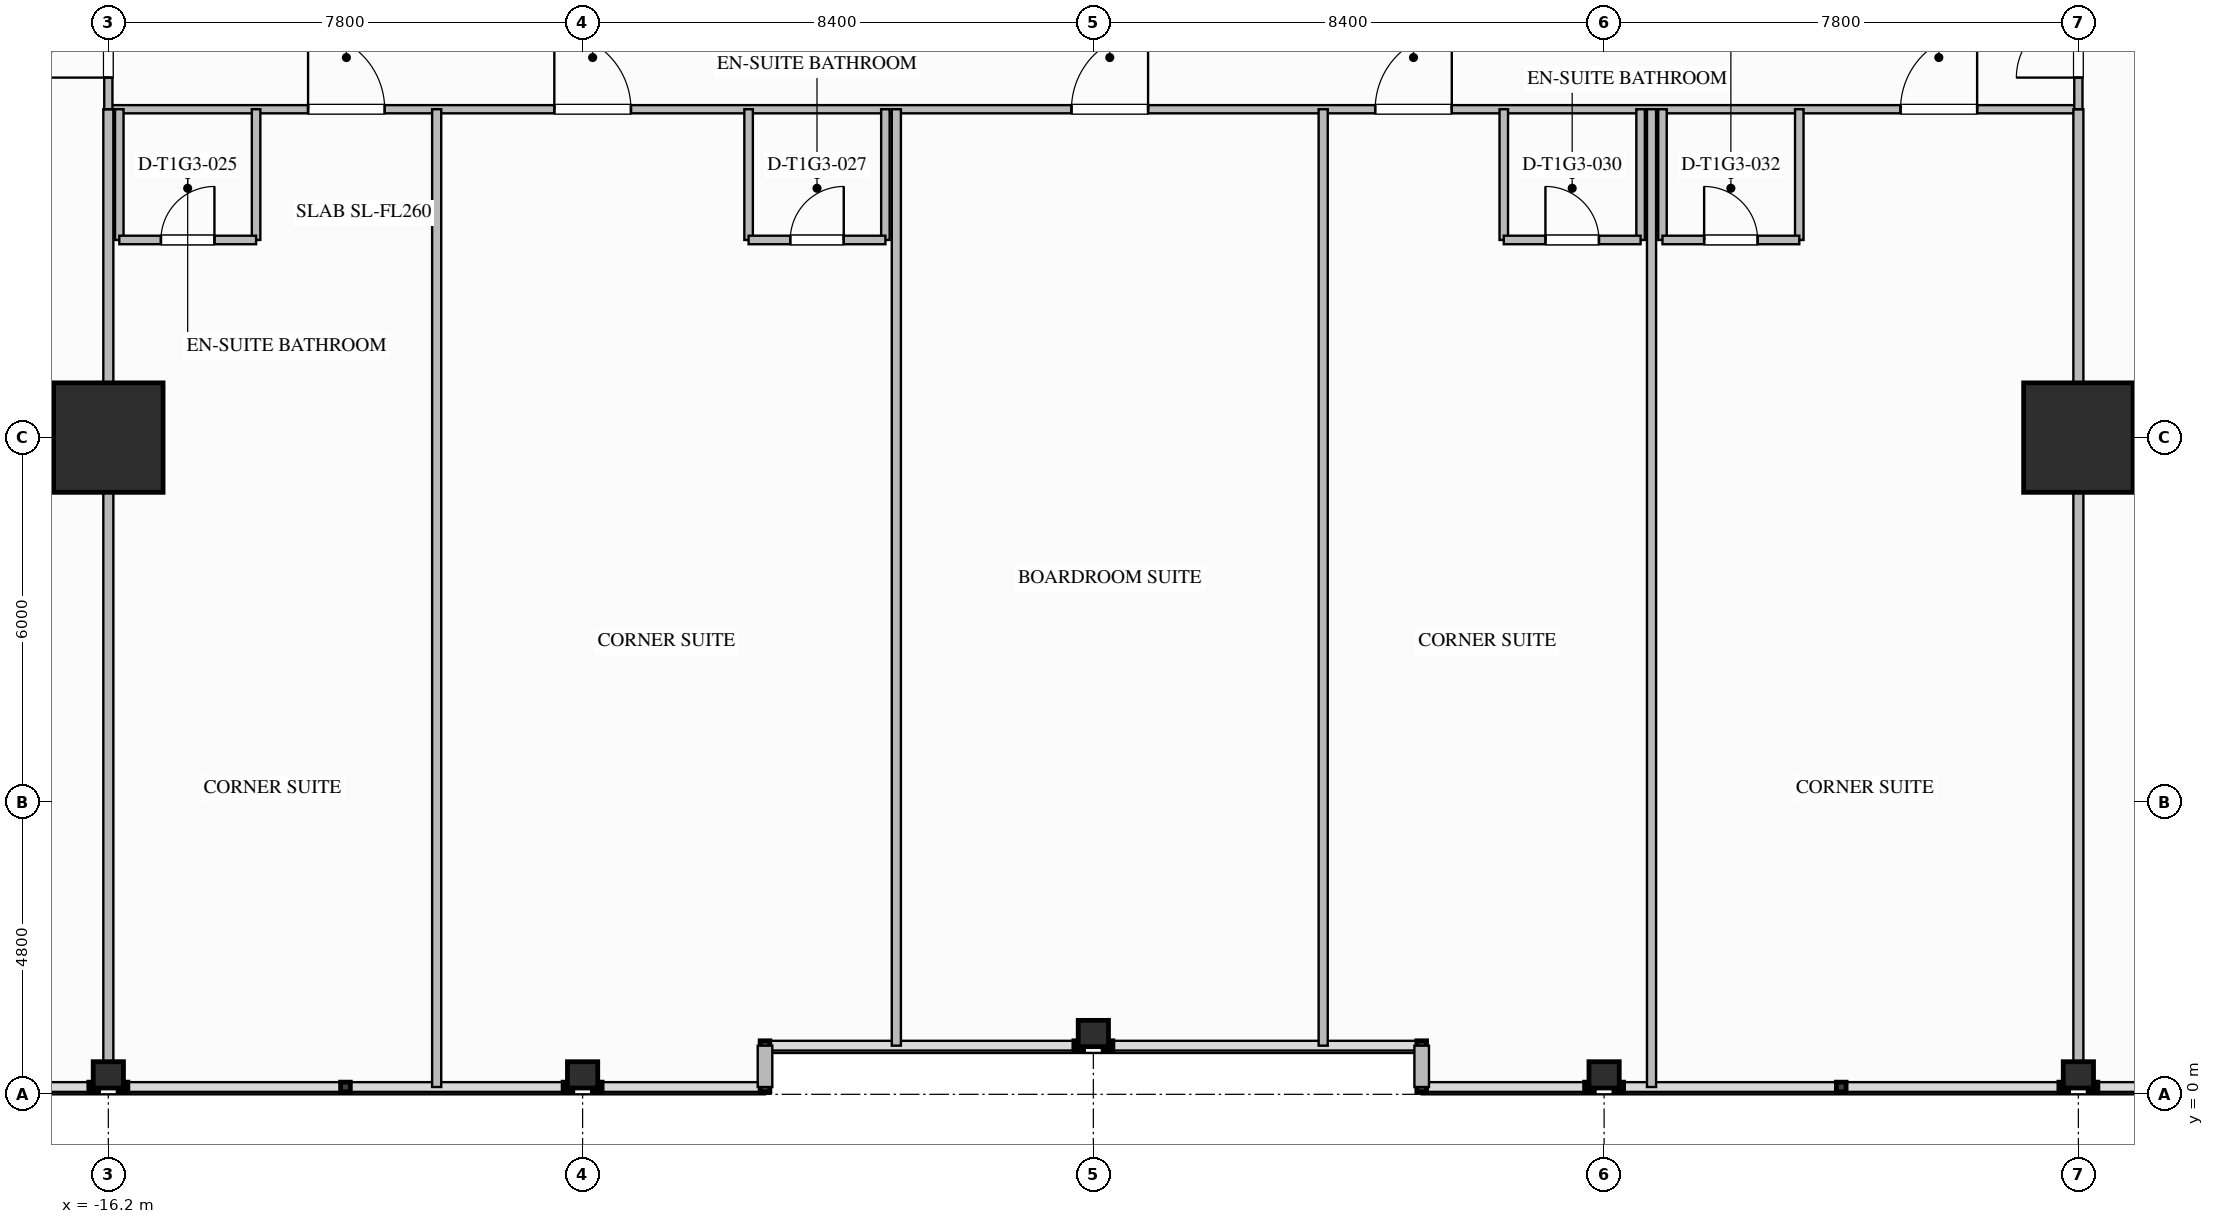
"""IFC4 building model, lengths in metres.
Left out: names, types, materials, properties, quantities, classifications, styles, units other than length and angle.
Written with IfcOpenShell. Run it as: python <this file> out.ifc"""

import sys

from ifc_helpers import new_model, si_unit, direction, frame, frame_2d, origin, origin_2d, place, context, subcontext, project, spatial, rectangle, i_section, extrude, element, fill, save


model = new_model("IFC4")
c1 = context("Model", 3, precision=1e-05, world=origin(), true_north=direction((0.0, 1.0)))
c2 = subcontext(c1, "Body", "Model", "MODEL_VIEW")
j1 = project(units=[si_unit("LENGTHUNIT", "METRE"), si_unit("PLANEANGLEUNIT", "RADIAN")], contexts=[c1])
p1 = place(None, origin())
s1 = spatial("IfcSite", under=j1, at=p1, CompositionType="ELEMENT")
p2 = place(p1, origin())
s2 = spatial("IfcBuilding", under=s1, at=p2, CompositionType="ELEMENT")
p3 = place(p2, frame((0.0, 0.0, 54.2)))
s3 = spatial("IfcBuildingStorey", under=s2, at=p3, CompositionType="ELEMENT", Elevation=54.2)
for number, where, z_axis, x_axis in (
    (1, (-16.2, 10.8, 0.0), (0.0, 0.0, 1.0), (1.0, 0.0, 0.0)),
    (2, (16.2, 10.8, 0.0), (0.0, 0.0, 1.0), (1.0, 0.0, 0.0)),
):
    element("IfcColumn", number, at=place(p3, frame(where, z_axis=z_axis, x_axis=x_axis)), inside=s3, PredefinedType="COLUMN", context=c2, shape_type="SweptSolid", body=[
        extrude(rectangle(XDim=1.8, YDim=1.8, at=origin_2d()), origin(), (0.0, 0.0, 1.0), 3.5),
    ])
for number, where, z_axis, x_axis in (
    (3, (-16.2, 0.32, 0.0), (0.0, 0.0, 1.0), (0.0, 1.0, 0.0)),
    (4, (-8.4, 0.32, 0.0), (0.0, 0.0, 1.0), (0.0, 1.0, 0.0)),
    (5, (0.0, 1.0, 0.0), (0.0, 0.0, 1.0), (0.0, 1.0, 0.0)),
    (6, (8.4, 0.32, 0.0), (0.0, 0.0, 1.0), (0.0, 1.0, 0.0)),
    (7, (16.2, 0.32, 0.0), (0.0, 0.0, 1.0), (0.0, 1.0, 0.0)),
):
    element("IfcColumn", number, at=place(p3, frame(where, z_axis=z_axis, x_axis=x_axis)), inside=s3, PredefinedType="COLUMN", context=c2, shape_type="SweptSolid", body=[
        extrude(i_section(OverallWidth=0.432, OverallDepth=0.498, WebThickness=0.056, FlangeThickness=0.089, FilletRadius=0.03, at=origin_2d()), origin(), (0.0, 0.0, 1.0), 3.497),
    ])
for number, where, z_axis, x_axis in (
    (8, (5.4, 0.12, 0.0), (0.0, 0.0, 1.0), (0.0, 1.0, 0.0)),
    (9, (-5.4, 0.8, 0.0), (0.0, 0.0, 1.0), (0.0, -1.0, 0.0)),
):
    element("IfcWall", number, at=place(p3, frame(where, z_axis=z_axis, x_axis=x_axis)), inside=s3, PredefinedType="STANDARD", context=c2, shape_type="SweptSolid", body=[
        extrude(rectangle(XDim=0.68, YDim=0.24, at=frame_2d((0.34, 0.0))), origin(), (0.0, 0.0, 1.0), 3.24),
    ])
p4 = place(p3, frame((-16.2, 16.2, 0.0), z_axis=(0.0, 0.0, 1.0), x_axis=(1.0, 0.0, 0.0)))
e10 = element("IfcWall", 10, at=p4, inside=s3, PredefinedType="PARTITIONING", context=c2, shape_type="SweptSolid", body=[
    extrude(rectangle(XDim=32.4, YDim=0.135, at=frame_2d((16.2, 0.0))), origin(), (0.0, 0.0, 1.0), 3.24),
])
p5 = place(p4, frame((3.285, 0.0, 0.0)))
e11 = element("IfcOpeningElement", 11, at=p5, cuts=e10, PredefinedType="OPENING", context=c2, shape_type="SweptSolid", body=[
    extrude(rectangle(XDim=1.26, YDim=2.2, at=frame_2d((0.63, 1.1))), frame((0.0, 0.077, 0.0), z_axis=(0.0, -1.0, 0.0), x_axis=(1.0, 0.0, 0.0)), (0.0, 0.0, 1.0), 0.155),
])
p6 = place(p4, frame((7.335, 0.0, 0.0)))
e12 = element("IfcOpeningElement", 12, at=p6, cuts=e10, PredefinedType="OPENING", context=c2, shape_type="SweptSolid", body=[
    extrude(rectangle(XDim=1.26, YDim=2.2, at=frame_2d((0.63, 1.1))), frame((0.0, 0.077, 0.0), z_axis=(0.0, -1.0, 0.0), x_axis=(1.0, 0.0, 0.0)), (0.0, 0.0, 1.0), 0.155),
])
p7 = place(p4, frame((15.84, 0.0, 0.0)))
e13 = element("IfcOpeningElement", 13, at=p7, cuts=e10, PredefinedType="OPENING", context=c2, shape_type="SweptSolid", body=[
    extrude(rectangle(XDim=1.26, YDim=2.2, at=frame_2d((0.63, 1.1))), frame((0.0, 0.077, 0.0), z_axis=(0.0, -1.0, 0.0), x_axis=(1.0, 0.0, 0.0)), (0.0, 0.0, 1.0), 0.155),
])
p8 = place(p4, frame((20.835, 0.0, 0.0)))
e14 = element("IfcOpeningElement", 14, at=p8, cuts=e10, PredefinedType="OPENING", context=c2, shape_type="SweptSolid", body=[
    extrude(rectangle(XDim=1.26, YDim=2.2, at=frame_2d((0.63, 1.1))), frame((0.0, 0.077, 0.0), z_axis=(0.0, -1.0, 0.0), x_axis=(1.0, 0.0, 0.0)), (0.0, 0.0, 1.0), 0.155),
])
p9 = place(p4, frame((29.475, 0.0, 0.0)))
e15 = element("IfcOpeningElement", 15, at=p9, cuts=e10, PredefinedType="OPENING", context=c2, shape_type="SweptSolid", body=[
    extrude(rectangle(XDim=1.26, YDim=2.2, at=frame_2d((0.63, 1.1))), frame((0.0, 0.077, 0.0), z_axis=(0.0, -1.0, 0.0), x_axis=(1.0, 0.0, 0.0)), (0.0, 0.0, 1.0), 0.155),
])
for number, where, z_axis, x_axis in (
    (16, (-16.2, 0.12, 0.0), (0.0, 0.0, 1.0), (0.0, 1.0, 0.0)),
    (17, (16.2, 0.12, 0.0), (0.0, 0.0, 1.0), (0.0, 1.0, 0.0)),
):
    element("IfcWall", number, at=place(p3, frame(where, z_axis=z_axis, x_axis=x_axis)), inside=s3, PredefinedType="PARTITIONING", context=c2, shape_type="SweptSolid", body=[
        extrude(rectangle(XDim=16.08, YDim=0.165, at=frame_2d((8.04, 0.0))), origin(), (0.0, 0.0, 1.0), 2.298),
    ])
p10 = place(p3, frame((-16.2, 16.2, 0.0), z_axis=(0.0, 0.0, 1.0), x_axis=(0.0, 1.0, 0.0)))
e18 = element("IfcWall", 18, at=p10, inside=s3, PredefinedType="PARTITIONING", context=c2, shape_type="SweptSolid", body=[
    extrude(rectangle(XDim=2.1, YDim=0.135, at=frame_2d((1.05, 0.0))), origin(), (0.0, 0.0, 1.0), 2.298),
])
p11 = place(p10, frame((0.52, 0.0, 0.0)))
e19 = element("IfcOpeningElement", 19, at=p11, cuts=e18, PredefinedType="OPENING", context=c2, shape_type="SweptSolid", body=[
    extrude(rectangle(XDim=1.02, YDim=2.15, at=frame_2d((0.51, 1.075))), frame((0.0, 0.077, 0.0), z_axis=(0.0, -1.0, 0.0), x_axis=(1.0, 0.0, 0.0)), (0.0, 0.0, 1.0), 0.155),
])
p12 = place(p3, frame((16.2, 16.2, 0.0), z_axis=(0.0, 0.0, 1.0), x_axis=(0.0, 1.0, 0.0)))
e20 = element("IfcWall", 20, at=p12, inside=s3, PredefinedType="PARTITIONING", context=c2, shape_type="SweptSolid", body=[
    extrude(rectangle(XDim=2.1, YDim=0.135, at=frame_2d((1.05, 0.0))), origin(), (0.0, 0.0, 1.0), 2.298),
])
p13 = place(p12, frame((0.52, 0.0, 0.0)))
e21 = element("IfcOpeningElement", 21, at=p13, cuts=e20, PredefinedType="OPENING", context=c2, shape_type="SweptSolid", body=[
    extrude(rectangle(XDim=1.02, YDim=2.15, at=frame_2d((0.51, 1.075))), frame((0.0, 0.077, 0.0), z_axis=(0.0, -1.0, 0.0), x_axis=(1.0, 0.0, 0.0)), (0.0, 0.0, 1.0), 0.155),
])
p14 = place(p3, frame((-16.02, 16.2, 0.0), z_axis=(0.0, 0.0, 1.0), x_axis=(0.0, -1.0, 0.0)))
e22 = element("IfcWall", 22, at=p14, inside=s3, PredefinedType="PLUMBINGWALL", context=c2, shape_type="SweptSolid", body=[
    extrude(rectangle(XDim=2.15, YDim=0.14, at=frame_2d((1.075, 0.0))), origin(), (0.0, 0.0, 1.0), 2.298),
])
p15 = place(p3, frame((-13.77, 16.2, 0.0), z_axis=(0.0, 0.0, 1.0), x_axis=(0.0, -1.0, 0.0)))
e23 = element("IfcWall", 23, at=p15, inside=s3, PredefinedType="PLUMBINGWALL", context=c2, shape_type="SweptSolid", body=[
    extrude(rectangle(XDim=2.15, YDim=0.14, at=frame_2d((1.075, 0.0))), origin(), (0.0, 0.0, 1.0), 3.24),
])
p16 = place(p3, frame((-16.02, 14.05, 0.0), z_axis=(0.0, 0.0, 1.0), x_axis=(1.0, 0.0, 0.0)))
e24 = element("IfcWall", 24, at=p16, inside=s3, PredefinedType="PLUMBINGWALL", context=c2, shape_type="SweptSolid", body=[
    extrude(rectangle(XDim=2.25, YDim=0.14, at=frame_2d((1.125, 0.0))), origin(), (0.0, 0.0, 1.0), 3.24),
])
p17 = place(p16, frame((0.685, 0.0, 0.0)))
e25 = element("IfcOpeningElement", 25, at=p17, cuts=e24, PredefinedType="OPENING", context=c2, shape_type="SweptSolid", body=[
    extrude(rectangle(XDim=0.88, YDim=2.1, at=frame_2d((0.44, 1.05))), frame((0.0, 0.08, 0.0), z_axis=(0.0, -1.0, 0.0), x_axis=(1.0, 0.0, 0.0)), (0.0, 0.0, 1.0), 0.16),
])
p18 = place(p3, frame((-10.8, 0.12, 0.0), z_axis=(0.0, 0.0, 1.0), x_axis=(0.0, 1.0, 0.0)))
e26 = element("IfcWall", 26, at=p18, inside=s3, PredefinedType="PARTITIONING", context=c2, shape_type="SweptSolid", body=[
    extrude(rectangle(XDim=16.08, YDim=0.15, at=frame_2d((8.04, 0.0))), origin(), (0.0, 0.0, 1.0), 3.24),
])
for number, where, z_axis, x_axis in (
    (27, (-5.67, 16.2, 0.0), (0.0, 0.0, 1.0), (0.0, -1.0, 0.0)),
    (28, (-3.42, 16.2, 0.0), (0.0, 0.0, 1.0), (0.0, -1.0, 0.0)),
):
    element("IfcWall", number, at=place(p3, frame(where, z_axis=z_axis, x_axis=x_axis)), inside=s3, PredefinedType="PLUMBINGWALL", context=c2, shape_type="SweptSolid", body=[
        extrude(rectangle(XDim=2.15, YDim=0.14, at=frame_2d((1.075, 0.0))), origin(), (0.0, 0.0, 1.0), 3.24),
    ])
p19 = place(p3, frame((-5.67, 14.05, 0.0), z_axis=(0.0, 0.0, 1.0), x_axis=(1.0, 0.0, 0.0)))
e29 = element("IfcWall", 29, at=p19, inside=s3, PredefinedType="PLUMBINGWALL", context=c2, shape_type="SweptSolid", body=[
    extrude(rectangle(XDim=2.25, YDim=0.14, at=frame_2d((1.125, 0.0))), origin(), (0.0, 0.0, 1.0), 3.24),
])
p20 = place(p19, frame((0.685, 0.0, 0.0)))
e30 = element("IfcOpeningElement", 30, at=p20, cuts=e29, PredefinedType="OPENING", context=c2, shape_type="SweptSolid", body=[
    extrude(rectangle(XDim=0.88, YDim=2.1, at=frame_2d((0.44, 1.05))), frame((0.0, 0.08, 0.0), z_axis=(0.0, -1.0, 0.0), x_axis=(1.0, 0.0, 0.0)), (0.0, 0.0, 1.0), 0.16),
])
for number, where, z_axis, x_axis in (
    (31, (-3.24, 0.8, 0.0), (0.0, 0.0, 1.0), (0.0, 1.0, 0.0)),
    (32, (3.78, 0.8, 0.0), (0.0, 0.0, 1.0), (0.0, 1.0, 0.0)),
):
    element("IfcWall", number, at=place(p3, frame(where, z_axis=z_axis, x_axis=x_axis)), inside=s3, PredefinedType="PARTITIONING", context=c2, shape_type="SweptSolid", body=[
        extrude(rectangle(XDim=15.4, YDim=0.15, at=frame_2d((7.7, 0.0))), origin(), (0.0, 0.0, 1.0), 3.24),
    ])
for number, where, z_axis, x_axis in (
    (33, (6.75, 16.2, 0.0), (0.0, 0.0, 1.0), (0.0, -1.0, 0.0)),
    (34, (9.0, 16.2, 0.0), (0.0, 0.0, 1.0), (0.0, -1.0, 0.0)),
):
    element("IfcWall", number, at=place(p3, frame(where, z_axis=z_axis, x_axis=x_axis)), inside=s3, PredefinedType="PLUMBINGWALL", context=c2, shape_type="SweptSolid", body=[
        extrude(rectangle(XDim=2.15, YDim=0.14, at=frame_2d((1.075, 0.0))), origin(), (0.0, 0.0, 1.0), 3.24),
    ])
p21 = place(p3, frame((6.75, 14.05, 0.0), z_axis=(0.0, 0.0, 1.0), x_axis=(1.0, 0.0, 0.0)))
e35 = element("IfcWall", 35, at=p21, inside=s3, PredefinedType="PLUMBINGWALL", context=c2, shape_type="SweptSolid", body=[
    extrude(rectangle(XDim=2.25, YDim=0.14, at=frame_2d((1.125, 0.0))), origin(), (0.0, 0.0, 1.0), 3.24),
])
p22 = place(p21, frame((0.685, 0.0, 0.0)))
e36 = element("IfcOpeningElement", 36, at=p22, cuts=e35, PredefinedType="OPENING", context=c2, shape_type="SweptSolid", body=[
    extrude(rectangle(XDim=0.88, YDim=2.1, at=frame_2d((0.44, 1.05))), frame((0.0, 0.08, 0.0), z_axis=(0.0, -1.0, 0.0), x_axis=(1.0, 0.0, 0.0)), (0.0, 0.0, 1.0), 0.16),
])
p23 = place(p3, frame((9.18, 0.12, 0.0), z_axis=(0.0, 0.0, 1.0), x_axis=(0.0, 1.0, 0.0)))
e37 = element("IfcWall", 37, at=p23, inside=s3, PredefinedType="PARTITIONING", context=c2, shape_type="SweptSolid", body=[
    extrude(rectangle(XDim=16.08, YDim=0.15, at=frame_2d((8.04, 0.0))), origin(), (0.0, 0.0, 1.0), 3.24),
])
for number, where, z_axis, x_axis in (
    (38, (9.36, 16.2, 0.0), (0.0, 0.0, 1.0), (0.0, -1.0, 0.0)),
    (39, (11.61, 16.2, 0.0), (0.0, 0.0, 1.0), (0.0, -1.0, 0.0)),
):
    element("IfcWall", number, at=place(p3, frame(where, z_axis=z_axis, x_axis=x_axis)), inside=s3, PredefinedType="PLUMBINGWALL", context=c2, shape_type="SweptSolid", body=[
        extrude(rectangle(XDim=2.15, YDim=0.14, at=frame_2d((1.075, 0.0))), origin(), (0.0, 0.0, 1.0), 3.24),
    ])
p24 = place(p3, frame((9.36, 14.05, 0.0), z_axis=(0.0, 0.0, 1.0), x_axis=(1.0, 0.0, 0.0)))
e40 = element("IfcWall", 40, at=p24, inside=s3, PredefinedType="PLUMBINGWALL", context=c2, shape_type="SweptSolid", body=[
    extrude(rectangle(XDim=2.25, YDim=0.14, at=frame_2d((1.125, 0.0))), origin(), (0.0, 0.0, 1.0), 3.24),
])
p25 = place(p24, frame((0.685, 0.0, 0.0)))
e41 = element("IfcOpeningElement", 41, at=p25, cuts=e40, PredefinedType="OPENING", context=c2, shape_type="SweptSolid", body=[
    extrude(rectangle(XDim=0.88, YDim=2.1, at=frame_2d((0.44, 1.05))), frame((0.0, 0.08, 0.0), z_axis=(0.0, -1.0, 0.0), x_axis=(1.0, 0.0, 0.0)), (0.0, 0.0, 1.0), 0.16),
])
p26 = place(p11, origin())
e42 = element("IfcDoor", 42, at=p26, inside=s3, OperationType="SINGLE_SWING_LEFT", PredefinedType="DOOR", context=c2, shape_type="SweptSolid", body=[
    extrude(rectangle(XDim=1.02, YDim=2.15, at=frame_2d((0.51, 1.075))), frame((0.0, 0.025, 0.0), z_axis=(0.0, -1.0, 0.0), x_axis=(1.0, 0.0, 0.0)), (0.0, 0.0, 1.0), 0.05),
])
fill(e19, e42)
p27 = place(p13, origin())
e43 = element("IfcDoor", 43, at=p27, inside=s3, OperationType="SINGLE_SWING_LEFT", PredefinedType="DOOR", context=c2, shape_type="SweptSolid", body=[
    extrude(rectangle(XDim=1.02, YDim=2.15, at=frame_2d((0.51, 1.075))), frame((0.0, 0.025, 0.0), z_axis=(0.0, -1.0, 0.0), x_axis=(1.0, 0.0, 0.0)), (0.0, 0.0, 1.0), 0.05),
])
fill(e21, e43)
p28 = place(p17, origin())
e44 = element("IfcDoor", 44, at=p28, inside=s3, OperationType="SINGLE_SWING_RIGHT", PredefinedType="DOOR", context=c2, shape_type="SweptSolid", body=[
    extrude(rectangle(XDim=0.88, YDim=2.1, at=frame_2d((0.44, 1.05))), frame((0.0, 0.025, 0.0), z_axis=(0.0, -1.0, 0.0), x_axis=(1.0, 0.0, 0.0)), (0.0, 0.0, 1.0), 0.05),
])
fill(e25, e44)
p29 = place(p5, origin())
e45 = element("IfcDoor", 45, at=p29, inside=s3, OperationType="SINGLE_SWING_LEFT", PredefinedType="DOOR", context=c2, shape_type="SweptSolid", body=[
    extrude(rectangle(XDim=1.26, YDim=2.2, at=frame_2d((0.63, 1.1))), frame((0.0, 0.025, 0.0), z_axis=(0.0, -1.0, 0.0), x_axis=(1.0, 0.0, 0.0)), (0.0, 0.0, 1.0), 0.05),
])
fill(e11, e45)
p30 = place(p20, origin())
e46 = element("IfcDoor", 46, at=p30, inside=s3, OperationType="SINGLE_SWING_RIGHT", PredefinedType="DOOR", context=c2, shape_type="SweptSolid", body=[
    extrude(rectangle(XDim=0.88, YDim=2.1, at=frame_2d((0.44, 1.05))), frame((0.0, 0.025, 0.0), z_axis=(0.0, -1.0, 0.0), x_axis=(1.0, 0.0, 0.0)), (0.0, 0.0, 1.0), 0.05),
])
fill(e30, e46)
p31 = place(p6, origin())
e47 = element("IfcDoor", 47, at=p31, inside=s3, OperationType="SINGLE_SWING_LEFT", PredefinedType="DOOR", context=c2, shape_type="SweptSolid", body=[
    extrude(rectangle(XDim=1.26, YDim=2.2, at=frame_2d((0.63, 1.1))), frame((0.0, 0.025, 0.0), z_axis=(0.0, -1.0, 0.0), x_axis=(1.0, 0.0, 0.0)), (0.0, 0.0, 1.0), 0.05),
])
fill(e12, e47)
p32 = place(p7, origin())
e48 = element("IfcDoor", 48, at=p32, inside=s3, OperationType="SINGLE_SWING_RIGHT", PredefinedType="DOOR", context=c2, shape_type="SweptSolid", body=[
    extrude(rectangle(XDim=1.26, YDim=2.2, at=frame_2d((0.63, 1.1))), frame((0.0, 0.025, 0.0), z_axis=(0.0, -1.0, 0.0), x_axis=(1.0, 0.0, 0.0)), (0.0, 0.0, 1.0), 0.05),
])
fill(e13, e48)
p33 = place(p22, origin())
e49 = element("IfcDoor", 49, at=p33, inside=s3, OperationType="SINGLE_SWING_LEFT", PredefinedType="DOOR", context=c2, shape_type="SweptSolid", body=[
    extrude(rectangle(XDim=0.88, YDim=2.1, at=frame_2d((0.44, 1.05))), frame((0.0, 0.025, 0.0), z_axis=(0.0, -1.0, 0.0), x_axis=(1.0, 0.0, 0.0)), (0.0, 0.0, 1.0), 0.05),
])
fill(e36, e49)
p34 = place(p8, origin())
e50 = element("IfcDoor", 50, at=p34, inside=s3, OperationType="SINGLE_SWING_RIGHT", PredefinedType="DOOR", context=c2, shape_type="SweptSolid", body=[
    extrude(rectangle(XDim=1.26, YDim=2.2, at=frame_2d((0.63, 1.1))), frame((0.0, 0.025, 0.0), z_axis=(0.0, -1.0, 0.0), x_axis=(1.0, 0.0, 0.0)), (0.0, 0.0, 1.0), 0.05),
])
fill(e14, e50)
p35 = place(p25, origin())
e51 = element("IfcDoor", 51, at=p35, inside=s3, OperationType="SINGLE_SWING_LEFT", PredefinedType="DOOR", context=c2, shape_type="SweptSolid", body=[
    extrude(rectangle(XDim=0.88, YDim=2.1, at=frame_2d((0.44, 1.05))), frame((0.0, 0.025, 0.0), z_axis=(0.0, -1.0, 0.0), x_axis=(1.0, 0.0, 0.0)), (0.0, 0.0, 1.0), 0.05),
])
fill(e41, e51)
p36 = place(p9, origin())
e52 = element("IfcDoor", 52, at=p36, inside=s3, OperationType="SINGLE_SWING_RIGHT", PredefinedType="DOOR", context=c2, shape_type="SweptSolid", body=[
    extrude(rectangle(XDim=1.26, YDim=2.2, at=frame_2d((0.63, 1.1))), frame((0.0, 0.025, 0.0), z_axis=(0.0, -1.0, 0.0), x_axis=(1.0, 0.0, 0.0)), (0.0, 0.0, 1.0), 0.05),
])
fill(e15, e52)
save(model, sys.argv[1])
